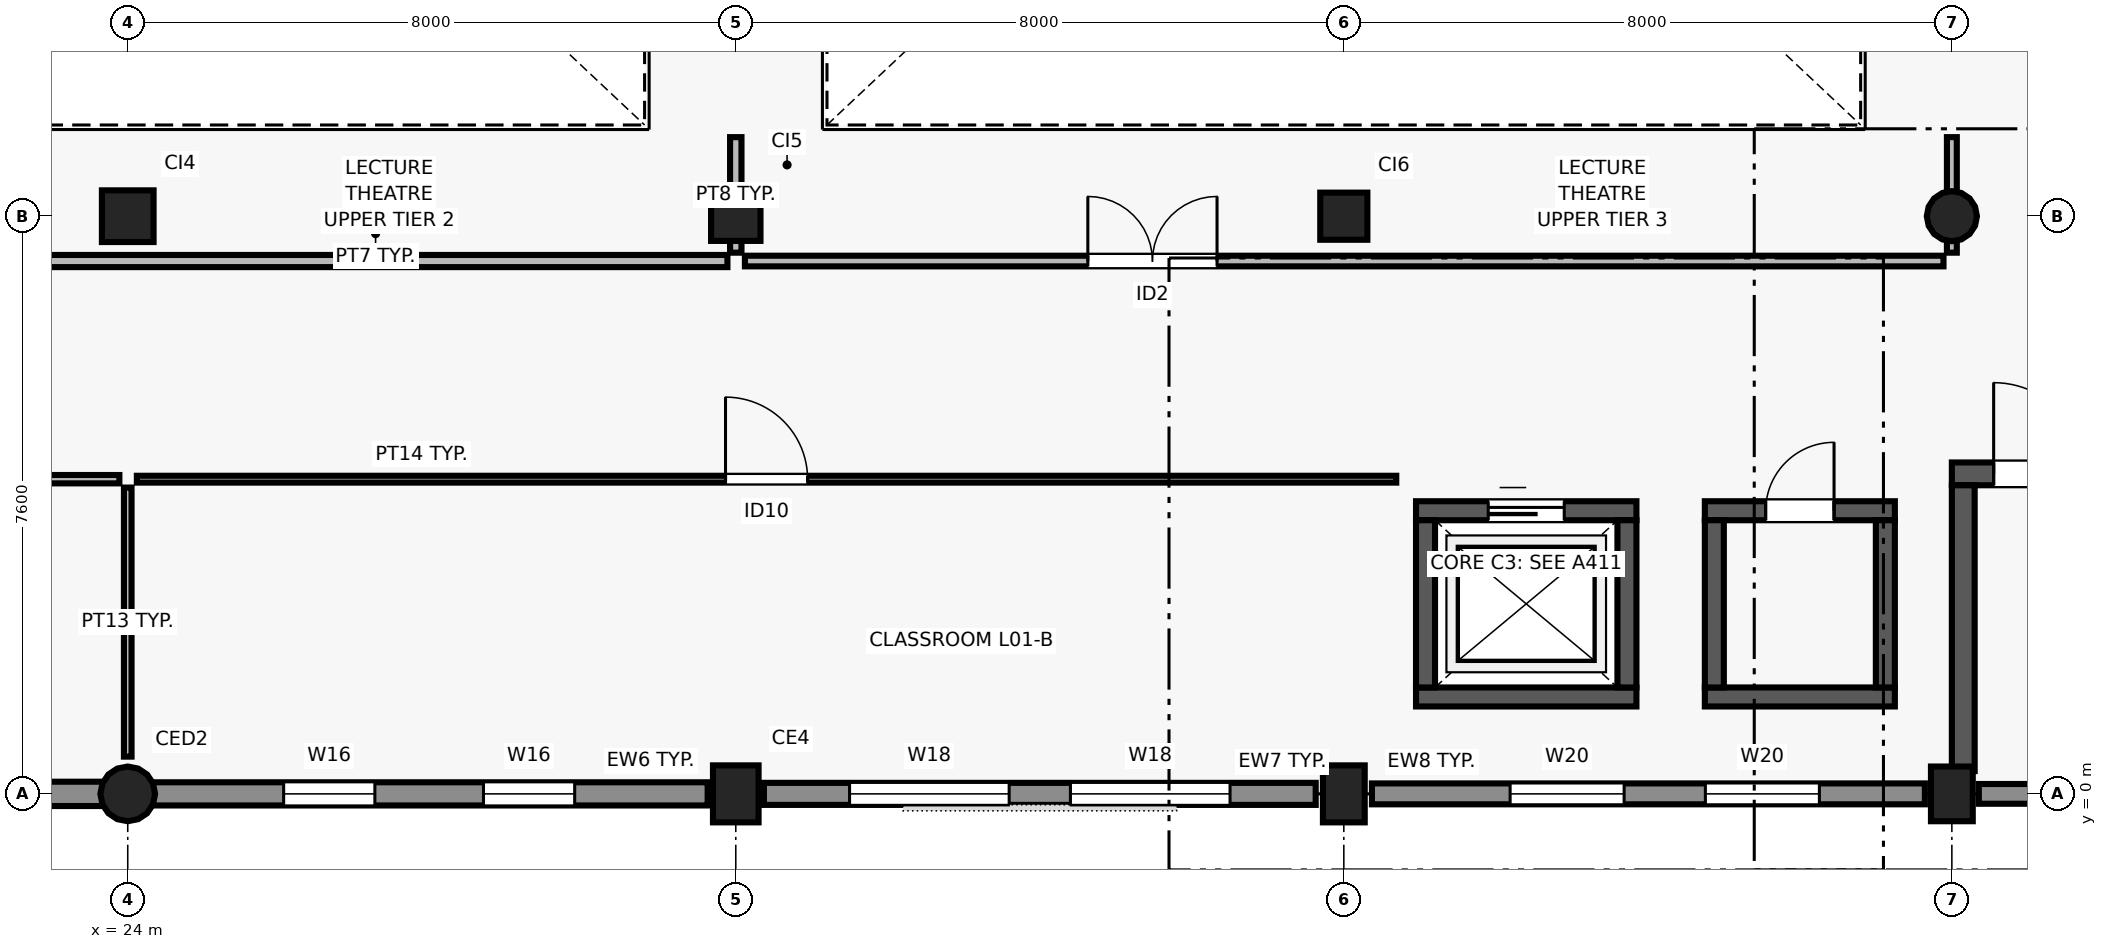
"""IFC4 building model, lengths in metres.
Left out: names, types, materials, properties, quantities, classifications, styles, units other than length and angle.
Written with IfcOpenShell. Run it as: python <this file> out.ifc"""

import sys

from ifc_helpers import new_model, si_unit, direction, frame, frame_2d, origin, origin_2d, place, context, subcontext, project, spatial, rectangle, circle, extrude, element, fill, save


model = new_model("IFC4")
c1 = context("Model", 3, precision=1e-05, world=origin(), true_north=direction((0.0, 1.0)))
c2 = subcontext(c1, "Body", "Model", "MODEL_VIEW")
j1 = project(units=[si_unit("LENGTHUNIT", "METRE"), si_unit("PLANEANGLEUNIT", "RADIAN")], contexts=[c1])
p1 = place(None, origin())
s1 = spatial("IfcSite", under=j1, at=p1, CompositionType="ELEMENT")
p2 = place(p1, origin())
s2 = spatial("IfcBuilding", under=s1, at=p2, CompositionType="ELEMENT")
p3 = place(p2, frame((0.0, 0.0, 4.5)))
s3 = spatial("IfcBuildingStorey", under=s2, at=p3, CompositionType="ELEMENT", Elevation=4.5)
p4 = place(p3, frame((24.0, 0.0, 0.0), z_axis=(0.0, 0.0, 1.0), x_axis=(1.0, 0.0, 0.0)))
e1 = element("IfcColumn", 1, at=p4, inside=s3, PredefinedType="COLUMN", context=c2, shape_type="SweptSolid", body=[
    extrude(circle(Radius=0.36, at=origin_2d()), origin(), (0.0, 0.0, 1.0), 4.5),
])
p5 = place(p3, frame((24.0, 7.6, 0.0), z_axis=(0.0, 0.0, 1.0), x_axis=(1.0, 0.0, 0.0)))
e2 = element("IfcColumn", 2, at=p5, inside=s3, PredefinedType="COLUMN", context=c2, shape_type="SweptSolid", body=[
    extrude(rectangle(XDim=0.68, YDim=0.68, at=origin_2d()), origin(), (0.0, 0.0, 1.0), 4.5),
])
p6 = place(p3, frame((32.0, 0.0, 0.0), z_axis=(0.0, 0.0, 1.0), x_axis=(1.0, 0.0, 0.0)))
e3 = element("IfcColumn", 3, at=p6, inside=s3, PredefinedType="COLUMN", context=c2, shape_type="SweptSolid", body=[
    extrude(rectangle(XDim=0.75, YDim=0.6, at=origin_2d()), origin(), (0.0, 0.0, 1.0), 4.5),
])
p7 = place(p3, frame((32.0, 7.6, 0.0), z_axis=(0.0, 0.0, 1.0), x_axis=(1.0, 0.0, 0.0)))
e4 = element("IfcColumn", 4, at=p7, inside=s3, PredefinedType="COLUMN", context=c2, shape_type="SweptSolid", body=[
    extrude(rectangle(XDim=0.65, YDim=0.65, at=origin_2d()), origin(), (0.0, 0.0, 1.0), 4.5),
])
p8 = place(p3, frame((40.0, 0.0, 0.0), z_axis=(0.0, 0.0, 1.0), x_axis=(1.0, 0.0, 0.0)))
e5 = element("IfcColumn", 5, at=p8, inside=s3, PredefinedType="COLUMN", context=c2, shape_type="SweptSolid", body=[
    extrude(rectangle(XDim=0.75, YDim=0.55, at=origin_2d()), origin(), (0.0, 0.0, 1.0), 4.5),
])
p9 = place(p3, frame((40.0, 7.6, 0.0), z_axis=(0.0, 0.0, 1.0), x_axis=(1.0, 0.0, 0.0)))
e6 = element("IfcColumn", 6, at=p9, inside=s3, PredefinedType="COLUMN", context=c2, shape_type="SweptSolid", body=[
    extrude(rectangle(XDim=0.62, YDim=0.62, at=origin_2d()), origin(), (0.0, 0.0, 1.0), 4.5),
])
p10 = place(p3, frame((48.0, 0.0, 0.0), z_axis=(0.0, 0.0, 1.0), x_axis=(1.0, 0.0, 0.0)))
e7 = element("IfcColumn", 7, at=p10, inside=s3, PredefinedType="COLUMN", context=c2, shape_type="SweptSolid", body=[
    extrude(rectangle(XDim=0.72, YDim=0.55, at=origin_2d()), origin(), (0.0, 0.0, 1.0), 4.5),
])
p11 = place(p3, frame((48.0, 7.6, 0.0), z_axis=(0.0, 0.0, 1.0), x_axis=(1.0, 0.0, 0.0)))
e8 = element("IfcColumn", 8, at=p11, inside=s3, PredefinedType="COLUMN", context=c2, shape_type="SweptSolid", body=[
    extrude(circle(Radius=0.33, at=origin_2d()), origin(), (0.0, 0.0, 1.0), 4.5),
])
p12 = place(p3, frame((16.355, 0.0, 0.0), z_axis=(0.0, 0.0, 1.0), x_axis=(1.0, 0.0, 0.0)))
e9 = element("IfcWall", 9, at=p12, inside=s3, PredefinedType="SOLIDWALL", context=c2, shape_type="SweptSolid", body=[
    extrude(rectangle(XDim=7.343, YDim=0.32, at=frame_2d((3.671, 0.0))), origin(), (0.0, 0.0, 1.0), 3.57),
])
p13 = place(p12, frame((1.488, 0.0, 0.9)))
e10 = element("IfcOpeningElement", 10, at=p13, cuts=e9, PredefinedType="OPENING", context=c2, shape_type="SweptSolid", body=[
    extrude(rectangle(XDim=1.6, YDim=1.5, at=frame_2d((0.8, 0.75))), frame((0.0, 0.17, 0.0), z_axis=(0.0, -1.0, 0.0), x_axis=(1.0, 0.0, 0.0)), (0.0, 0.0, 1.0), 0.34),
])
p14 = place(p12, frame((4.255, 0.0, 0.9)))
e11 = element("IfcOpeningElement", 11, at=p14, cuts=e9, PredefinedType="OPENING", context=c2, shape_type="SweptSolid", body=[
    extrude(rectangle(XDim=1.6, YDim=1.5, at=frame_2d((0.8, 0.75))), frame((0.0, 0.17, 0.0), z_axis=(0.0, -1.0, 0.0), x_axis=(1.0, 0.0, 0.0)), (0.0, 0.0, 1.0), 0.34),
])
p15 = place(p3, frame((24.302, 0.0, 0.0), z_axis=(0.0, 0.0, 1.0), x_axis=(1.0, 0.0, 0.0)))
e12 = element("IfcWall", 12, at=p15, inside=s3, PredefinedType="SOLIDWALL", context=c2, shape_type="SweptSolid", body=[
    extrude(rectangle(XDim=7.327, YDim=0.305, at=frame_2d((3.664, 0.0))), origin(), (0.0, 0.0, 1.0), 3.57),
])
p16 = place(p15, frame((1.749, 0.0, 0.9)))
e13 = element("IfcOpeningElement", 13, at=p16, cuts=e12, PredefinedType="OPENING", context=c2, shape_type="SweptSolid", body=[
    extrude(rectangle(XDim=1.2, YDim=1.5, at=frame_2d((0.6, 0.75))), frame((0.0, 0.162, 0.0), z_axis=(0.0, -1.0, 0.0), x_axis=(1.0, 0.0, 0.0)), (0.0, 0.0, 1.0), 0.325),
])
p17 = place(p15, frame((4.378, 0.0, 0.9)))
e14 = element("IfcOpeningElement", 14, at=p17, cuts=e12, PredefinedType="OPENING", context=c2, shape_type="SweptSolid", body=[
    extrude(rectangle(XDim=1.2, YDim=1.5, at=frame_2d((0.6, 0.75))), frame((0.0, 0.162, 0.0), z_axis=(0.0, -1.0, 0.0), x_axis=(1.0, 0.0, 0.0)), (0.0, 0.0, 1.0), 0.325),
])
p18 = place(p3, frame((32.37, 0.0, 0.0), z_axis=(0.0, 0.0, 1.0), x_axis=(1.0, 0.0, 0.0)))
e15 = element("IfcWall", 15, at=p18, inside=s3, PredefinedType="SOLIDWALL", context=c2, shape_type="SweptSolid", body=[
    extrude(rectangle(XDim=7.26, YDim=0.29, at=frame_2d((3.63, 0.0))), origin(), (0.0, 0.0, 1.0), 3.67),
])
p19 = place(p18, frame((1.127, 0.0, 0.9)))
e16 = element("IfcOpeningElement", 16, at=p19, cuts=e15, PredefinedType="OPENING", context=c2, shape_type="SweptSolid", body=[
    extrude(rectangle(XDim=2.1, YDim=1.25, at=frame_2d((1.05, 0.625))), frame((0.0, 0.155, 0.0), z_axis=(0.0, -1.0, 0.0), x_axis=(1.0, 0.0, 0.0)), (0.0, 0.0, 1.0), 0.31),
])
p20 = place(p18, frame((4.033, 0.0, 0.9)))
e17 = element("IfcOpeningElement", 17, at=p20, cuts=e15, PredefinedType="OPENING", context=c2, shape_type="SweptSolid", body=[
    extrude(rectangle(XDim=2.1, YDim=1.25, at=frame_2d((1.05, 0.625))), frame((0.0, 0.155, 0.0), z_axis=(0.0, -1.0, 0.0), x_axis=(1.0, 0.0, 0.0)), (0.0, 0.0, 1.0), 0.31),
])
p21 = place(p3, frame((40.37, 0.0, 0.0), z_axis=(0.0, 0.0, 1.0), x_axis=(1.0, 0.0, 0.0)))
e18 = element("IfcWall", 18, at=p21, inside=s3, PredefinedType="SOLIDWALL", context=c2, shape_type="SweptSolid", body=[
    extrude(rectangle(XDim=7.275, YDim=0.275, at=frame_2d((3.637, 0.0))), origin(), (0.0, 0.0, 1.0), 3.57),
])
p22 = place(p21, frame((1.818, 0.0, 0.9)))
e19 = element("IfcOpeningElement", 19, at=p22, cuts=e18, PredefinedType="OPENING", context=c2, shape_type="SweptSolid", body=[
    extrude(rectangle(XDim=1.5, YDim=1.25, at=frame_2d((0.75, 0.625))), frame((0.0, 0.147, 0.0), z_axis=(0.0, -1.0, 0.0), x_axis=(1.0, 0.0, 0.0)), (0.0, 0.0, 1.0), 0.295),
])
p23 = place(p21, frame((4.387, 0.0, 0.9)))
e20 = element("IfcOpeningElement", 20, at=p23, cuts=e18, PredefinedType="OPENING", context=c2, shape_type="SweptSolid", body=[
    extrude(rectangle(XDim=1.5, YDim=1.25, at=frame_2d((0.75, 0.625))), frame((0.0, 0.147, 0.0), z_axis=(0.0, -1.0, 0.0), x_axis=(1.0, 0.0, 0.0)), (0.0, 0.0, 1.0), 0.295),
])
p24 = place(p3, frame((48.355, 0.0, 0.0), z_axis=(0.0, 0.0, 1.0), x_axis=(1.0, 0.0, 0.0)))
e21 = element("IfcWall", 21, at=p24, inside=s3, PredefinedType="SOLIDWALL", context=c2, shape_type="SweptSolid", body=[
    extrude(rectangle(XDim=7.343, YDim=0.26, at=frame_2d((3.671, 0.0))), origin(), (0.0, 0.0, 1.0), 4.22),
])
p25 = place(p3, frame((48.0, 4.21, 0.0), z_axis=(0.0, 0.0, 1.0), x_axis=(1.0, 0.0, 0.0)))
e22 = element("IfcWall", 22, at=p25, inside=s3, PredefinedType="SHEAR", context=c2, shape_type="SweptSolid", body=[
    extrude(rectangle(XDim=8.0, YDim=0.3, at=frame_2d((4.0, 0.0))), origin(), (0.0, 0.0, 1.0), 4.22),
])
p26 = place(p25, frame((0.55, 0.0, 0.0)))
e23 = element("IfcOpeningElement", 23, at=p26, cuts=e22, PredefinedType="OPENING", context=c2, shape_type="SweptSolid", body=[
    extrude(rectangle(XDim=1.2, YDim=2.2, at=frame_2d((0.6, 1.1))), frame((0.0, 0.16, 0.0), z_axis=(0.0, -1.0, 0.0), x_axis=(1.0, 0.0, 0.0)), (0.0, 0.0, 1.0), 0.32),
])
p27 = place(p3, frame((48.15, 0.3, 0.0), z_axis=(0.0, 0.0, 1.0), x_axis=(0.0, 1.0, 0.0)))
e24 = element("IfcWall", 24, at=p27, inside=s3, PredefinedType="SHEAR", context=c2, shape_type="SweptSolid", body=[
    extrude(rectangle(XDim=3.76, YDim=0.3, at=frame_2d((1.88, 0.0))), origin(), (0.0, 0.0, 1.0), 4.22),
])
p28 = place(p3, frame((40.95, 1.275, 0.0), z_axis=(0.0, 0.0, 1.0), x_axis=(1.0, 0.0, 0.0)))
e25 = element("IfcWall", 25, at=p28, inside=s3, PredefinedType="SHEAR", context=c2, shape_type="SweptSolid", body=[
    extrude(rectangle(XDim=2.9, YDim=0.25, at=frame_2d((1.45, 0.0))), origin(), (0.0, 0.0, 1.0), 4.22),
])
p29 = place(p3, frame((40.95, 3.725, 0.0), z_axis=(0.0, 0.0, 1.0), x_axis=(1.0, 0.0, 0.0)))
e26 = element("IfcWall", 26, at=p29, inside=s3, PredefinedType="SHEAR", context=c2, shape_type="SweptSolid", body=[
    extrude(rectangle(XDim=2.9, YDim=0.25, at=frame_2d((1.45, 0.0))), origin(), (0.0, 0.0, 1.0), 4.22),
])
p30 = place(p29, frame((0.95, 0.0, 0.0)))
e27 = element("IfcOpeningElement", 27, at=p30, cuts=e26, PredefinedType="OPENING", context=c2, shape_type="SweptSolid", body=[
    extrude(rectangle(XDim=1.0, YDim=2.15, at=frame_2d((0.5, 1.075))), frame((0.0, 0.135, 0.0), z_axis=(0.0, -1.0, 0.0), x_axis=(1.0, 0.0, 0.0)), (0.0, 0.0, 1.0), 0.27),
])
for number, where, z_axis, x_axis in (
    (28, (41.075, 1.4, 0.0), (0.0, 0.0, 1.0), (0.0, 1.0, 0.0)),
    (29, (43.725, 1.4, 0.0), (0.0, 0.0, 1.0), (0.0, 1.0, 0.0)),
):
    element("IfcWall", number, at=place(p3, frame(where, z_axis=z_axis, x_axis=x_axis)), inside=s3, PredefinedType="SHEAR", context=c2, shape_type="SweptSolid", body=[
        extrude(rectangle(XDim=2.2, YDim=0.25, at=frame_2d((1.1, 0.0))), origin(), (0.0, 0.0, 1.0), 4.22),
    ])
p31 = place(p3, frame((44.75, 1.275, 0.0), z_axis=(0.0, 0.0, 1.0), x_axis=(1.0, 0.0, 0.0)))
e30 = element("IfcWall", 30, at=p31, inside=s3, PredefinedType="SHEAR", context=c2, shape_type="SweptSolid", body=[
    extrude(rectangle(XDim=2.5, YDim=0.25, at=frame_2d((1.25, 0.0))), origin(), (0.0, 0.0, 1.0), 4.22),
])
p32 = place(p3, frame((44.75, 3.725, 0.0), z_axis=(0.0, 0.0, 1.0), x_axis=(1.0, 0.0, 0.0)))
e31 = element("IfcWall", 31, at=p32, inside=s3, PredefinedType="SHEAR", context=c2, shape_type="SweptSolid", body=[
    extrude(rectangle(XDim=2.5, YDim=0.25, at=frame_2d((1.25, 0.0))), origin(), (0.0, 0.0, 1.0), 4.22),
])
p33 = place(p32, frame((0.8, 0.0, 0.0)))
e32 = element("IfcOpeningElement", 32, at=p33, cuts=e31, PredefinedType="OPENING", context=c2, shape_type="SweptSolid", body=[
    extrude(rectangle(XDim=0.9, YDim=2.05, at=frame_2d((0.45, 1.025))), frame((0.0, 0.135, 0.0), z_axis=(0.0, -1.0, 0.0), x_axis=(1.0, 0.0, 0.0)), (0.0, 0.0, 1.0), 0.27),
])
for number, where, z_axis, x_axis in (
    (33, (44.875, 1.4, 0.0), (0.0, 0.0, 1.0), (0.0, 1.0, 0.0)),
    (34, (47.125, 1.4, 0.0), (0.0, 0.0, 1.0), (0.0, 1.0, 0.0)),
):
    element("IfcWall", number, at=place(p3, frame(where, z_axis=z_axis, x_axis=x_axis)), inside=s3, PredefinedType="SHEAR", context=c2, shape_type="SweptSolid", body=[
        extrude(rectangle(XDim=2.2, YDim=0.25, at=frame_2d((1.1, 0.0))), origin(), (0.0, 0.0, 1.0), 4.22),
    ])
p34 = place(p3, frame((8.26, 4.14, 0.0), z_axis=(0.0, 0.0, 1.0), x_axis=(1.0, 0.0, 0.0)))
e35 = element("IfcWall", 35, at=p34, inside=s3, PredefinedType="PARTITIONING", context=c2, shape_type="SweptSolid", body=[
    extrude(rectangle(XDim=15.63, YDim=0.11, at=frame_2d((7.815, 0.0))), origin(), (0.0, 0.0, 1.0), 4.2),
])
p35 = place(p34, frame((7.295, 0.0, 0.0)))
e36 = element("IfcOpeningElement", 36, at=p35, cuts=e35, PredefinedType="OPENING", context=c2, shape_type="SweptSolid", body=[
    extrude(rectangle(XDim=1.04, YDim=2.15, at=frame_2d((0.52, 1.075))), frame((0.0, 0.065, 0.0), z_axis=(0.0, -1.0, 0.0), x_axis=(1.0, 0.0, 0.0)), (0.0, 0.0, 1.0), 0.13),
])
p36 = place(p3, frame((24.0, 0.49, 0.0), z_axis=(0.0, 0.0, 1.0), x_axis=(0.0, 1.0, 0.0)))
e37 = element("IfcWall", 37, at=p36, inside=s3, PredefinedType="PARTITIONING", context=c2, shape_type="SweptSolid", body=[
    extrude(rectangle(XDim=3.54, YDim=0.1, at=frame_2d((1.77, 0.0))), origin(), (0.0, 0.0, 1.0), 3.77),
])
p37 = place(p3, frame((24.12, 4.14, 0.0), z_axis=(0.0, 0.0, 1.0), x_axis=(1.0, 0.0, 0.0)))
e38 = element("IfcWall", 38, at=p37, inside=s3, PredefinedType="PARTITIONING", context=c2, shape_type="SweptSolid", body=[
    extrude(rectangle(XDim=16.57, YDim=0.09, at=frame_2d((8.285, 0.0))), origin(), (0.0, 0.0, 1.0), 4.2),
])
p38 = place(p37, frame((7.745, 0.0, 0.0)))
e39 = element("IfcOpeningElement", 39, at=p38, cuts=e38, PredefinedType="OPENING", context=c2, shape_type="SweptSolid", body=[
    extrude(rectangle(XDim=1.08, YDim=2.15, at=frame_2d((0.54, 1.075))), frame((0.0, 0.055, 0.0), z_axis=(0.0, -1.0, 0.0), x_axis=(1.0, 0.0, 0.0)), (0.0, 0.0, 1.0), 0.11),
])
p39 = place(p3, frame((16.12, 7.01, 0.0), z_axis=(0.0, 0.0, 1.0), x_axis=(1.0, 0.0, 0.0)))
e40 = element("IfcWall", 40, at=p39, inside=s3, PredefinedType="PARTITIONING", context=c2, shape_type="SweptSolid", body=[
    extrude(rectangle(XDim=15.77, YDim=0.16, at=frame_2d((7.885, 0.0))), origin(), (0.0, 0.0, 1.0), 4.2),
])
p40 = place(p39, frame((4.462, 0.0, 0.0)))
e41 = element("IfcOpeningElement", 41, at=p40, cuts=e40, PredefinedType="OPENING", context=c2, shape_type="SweptSolid", body=[
    extrude(rectangle(XDim=1.8, YDim=2.3, at=frame_2d((0.9, 1.15))), frame((0.0, 0.09, 0.0), z_axis=(0.0, -1.0, 0.0), x_axis=(1.0, 0.0, 0.0)), (0.0, 0.0, 1.0), 0.18),
])
p41 = place(p3, frame((32.0, 7.12, 0.0), z_axis=(0.0, 0.0, 1.0), x_axis=(0.0, 1.0, 0.0)))
e42 = element("IfcWall", 42, at=p41, inside=s3, PredefinedType="PARTITIONING", context=c2, shape_type="SweptSolid", body=[
    extrude(rectangle(XDim=1.52, YDim=0.15, at=frame_2d((0.76, 0.0))), origin(), (0.0, 0.0, 1.0), 3.64),
])
p42 = place(p3, frame((32.12, 7.01, 0.0), z_axis=(0.0, 0.0, 1.0), x_axis=(1.0, 0.0, 0.0)))
e43 = element("IfcWall", 43, at=p42, inside=s3, PredefinedType="PARTITIONING", context=c2, shape_type="SweptSolid", body=[
    extrude(rectangle(XDim=15.77, YDim=0.14, at=frame_2d((7.885, 0.0))), origin(), (0.0, 0.0, 1.0), 4.2),
])
p43 = place(p42, frame((4.512, 0.0, 0.0)))
e44 = element("IfcOpeningElement", 44, at=p43, cuts=e43, PredefinedType="OPENING", context=c2, shape_type="SweptSolid", body=[
    extrude(rectangle(XDim=1.7, YDim=2.3, at=frame_2d((0.85, 1.15))), frame((0.0, 0.08, 0.0), z_axis=(0.0, -1.0, 0.0), x_axis=(1.0, 0.0, 0.0)), (0.0, 0.0, 1.0), 0.16),
])
p44 = place(p3, frame((48.0, 7.12, 0.0), z_axis=(0.0, 0.0, 1.0), x_axis=(0.0, 1.0, 0.0)))
e45 = element("IfcWall", 45, at=p44, inside=s3, PredefinedType="PARTITIONING", context=c2, shape_type="SweptSolid", body=[
    extrude(rectangle(XDim=1.52, YDim=0.13, at=frame_2d((0.76, 0.0))), origin(), (0.0, 0.0, 1.0), 3.74),
])
p45 = place(p16, origin())
e46 = element("IfcWindow", 46, at=p45, inside=s3, PartitioningType="SINGLE_PANEL", PredefinedType="WINDOW", context=c2, shape_type="SweptSolid", body=[
    extrude(rectangle(XDim=1.2, YDim=1.5, at=frame_2d((0.6, 0.75))), frame((0.0, 0.03, 0.0), z_axis=(0.0, -1.0, 0.0), x_axis=(1.0, 0.0, 0.0)), (0.0, 0.0, 1.0), 0.06),
])
fill(e13, e46)
p46 = place(p17, origin())
e47 = element("IfcWindow", 47, at=p46, inside=s3, PartitioningType="SINGLE_PANEL", PredefinedType="WINDOW", context=c2, shape_type="SweptSolid", body=[
    extrude(rectangle(XDim=1.2, YDim=1.5, at=frame_2d((0.6, 0.75))), frame((0.0, 0.03, 0.0), z_axis=(0.0, -1.0, 0.0), x_axis=(1.0, 0.0, 0.0)), (0.0, 0.0, 1.0), 0.06),
])
fill(e14, e47)
p47 = place(p19, origin())
e48 = element("IfcWindow", 48, at=p47, inside=s3, PartitioningType="SINGLE_PANEL", PredefinedType="WINDOW", context=c2, shape_type="SweptSolid", body=[
    extrude(rectangle(XDim=2.1, YDim=1.25, at=frame_2d((1.05, 0.625))), frame((0.0, 0.03, 0.0), z_axis=(0.0, -1.0, 0.0), x_axis=(1.0, 0.0, 0.0)), (0.0, 0.0, 1.0), 0.06),
])
fill(e16, e48)
p48 = place(p20, origin())
e49 = element("IfcWindow", 49, at=p48, inside=s3, PartitioningType="SINGLE_PANEL", PredefinedType="WINDOW", context=c2, shape_type="SweptSolid", body=[
    extrude(rectangle(XDim=2.1, YDim=1.25, at=frame_2d((1.05, 0.625))), frame((0.0, 0.03, 0.0), z_axis=(0.0, -1.0, 0.0), x_axis=(1.0, 0.0, 0.0)), (0.0, 0.0, 1.0), 0.06),
])
fill(e17, e49)
p49 = place(p22, origin())
e50 = element("IfcWindow", 50, at=p49, inside=s3, PartitioningType="SINGLE_PANEL", PredefinedType="WINDOW", context=c2, shape_type="SweptSolid", body=[
    extrude(rectangle(XDim=1.5, YDim=1.25, at=frame_2d((0.75, 0.625))), frame((0.0, 0.03, 0.0), z_axis=(0.0, -1.0, 0.0), x_axis=(1.0, 0.0, 0.0)), (0.0, 0.0, 1.0), 0.06),
])
fill(e19, e50)
p50 = place(p23, origin())
e51 = element("IfcWindow", 51, at=p50, inside=s3, PartitioningType="SINGLE_PANEL", PredefinedType="WINDOW", context=c2, shape_type="SweptSolid", body=[
    extrude(rectangle(XDim=1.5, YDim=1.25, at=frame_2d((0.75, 0.625))), frame((0.0, 0.03, 0.0), z_axis=(0.0, -1.0, 0.0), x_axis=(1.0, 0.0, 0.0)), (0.0, 0.0, 1.0), 0.06),
])
fill(e20, e51)
p51 = place(p26, origin())
e52 = element("IfcDoor", 52, at=p51, inside=s3, OperationType="SINGLE_SWING_LEFT", PredefinedType="DOOR", context=c2, shape_type="SweptSolid", body=[
    extrude(rectangle(XDim=1.2, YDim=2.2, at=frame_2d((0.6, 1.1))), frame((0.0, 0.025, 0.0), z_axis=(0.0, -1.0, 0.0), x_axis=(1.0, 0.0, 0.0)), (0.0, 0.0, 1.0), 0.05),
])
fill(e23, e52)
p52 = place(p33, origin())
e53 = element("IfcDoor", 53, at=p52, inside=s3, OperationType="SINGLE_SWING_RIGHT", PredefinedType="DOOR", context=c2, shape_type="SweptSolid", body=[
    extrude(rectangle(XDim=0.9, YDim=2.05, at=frame_2d((0.45, 1.025))), frame((0.0, 0.025, 0.0), z_axis=(0.0, -1.0, 0.0), x_axis=(1.0, 0.0, 0.0)), (0.0, 0.0, 1.0), 0.05),
])
fill(e32, e53)
p53 = place(p30, origin())
e54 = element("IfcDoor", 54, at=p53, inside=s3, OperationType="SLIDING_TO_LEFT", PredefinedType="DOOR", context=c2, shape_type="SweptSolid", body=[
    extrude(rectangle(XDim=1.0, YDim=2.15, at=frame_2d((0.5, 1.075))), frame((0.0, 0.025, 0.0), z_axis=(0.0, -1.0, 0.0), x_axis=(1.0, 0.0, 0.0)), (0.0, 0.0, 1.0), 0.05),
])
fill(e27, e54)
p54 = place(p38, origin())
e55 = element("IfcDoor", 55, at=p54, inside=s3, OperationType="SINGLE_SWING_LEFT", PredefinedType="DOOR", context=c2, shape_type="SweptSolid", body=[
    extrude(rectangle(XDim=1.08, YDim=2.15, at=frame_2d((0.54, 1.075))), frame((0.0, 0.025, 0.0), z_axis=(0.0, -1.0, 0.0), x_axis=(1.0, 0.0, 0.0)), (0.0, 0.0, 1.0), 0.05),
])
fill(e39, e55)
p55 = place(p43, origin())
e56 = element("IfcDoor", 56, at=p55, inside=s3, OperationType="DOUBLE_DOOR_SINGLE_SWING", PredefinedType="DOOR", context=c2, shape_type="SweptSolid", body=[
    extrude(rectangle(XDim=1.7, YDim=2.3, at=frame_2d((0.85, 1.15))), frame((0.0, 0.025, 0.0), z_axis=(0.0, -1.0, 0.0), x_axis=(1.0, 0.0, 0.0)), (0.0, 0.0, 1.0), 0.05),
])
fill(e44, e56)
save(model, sys.argv[1])
